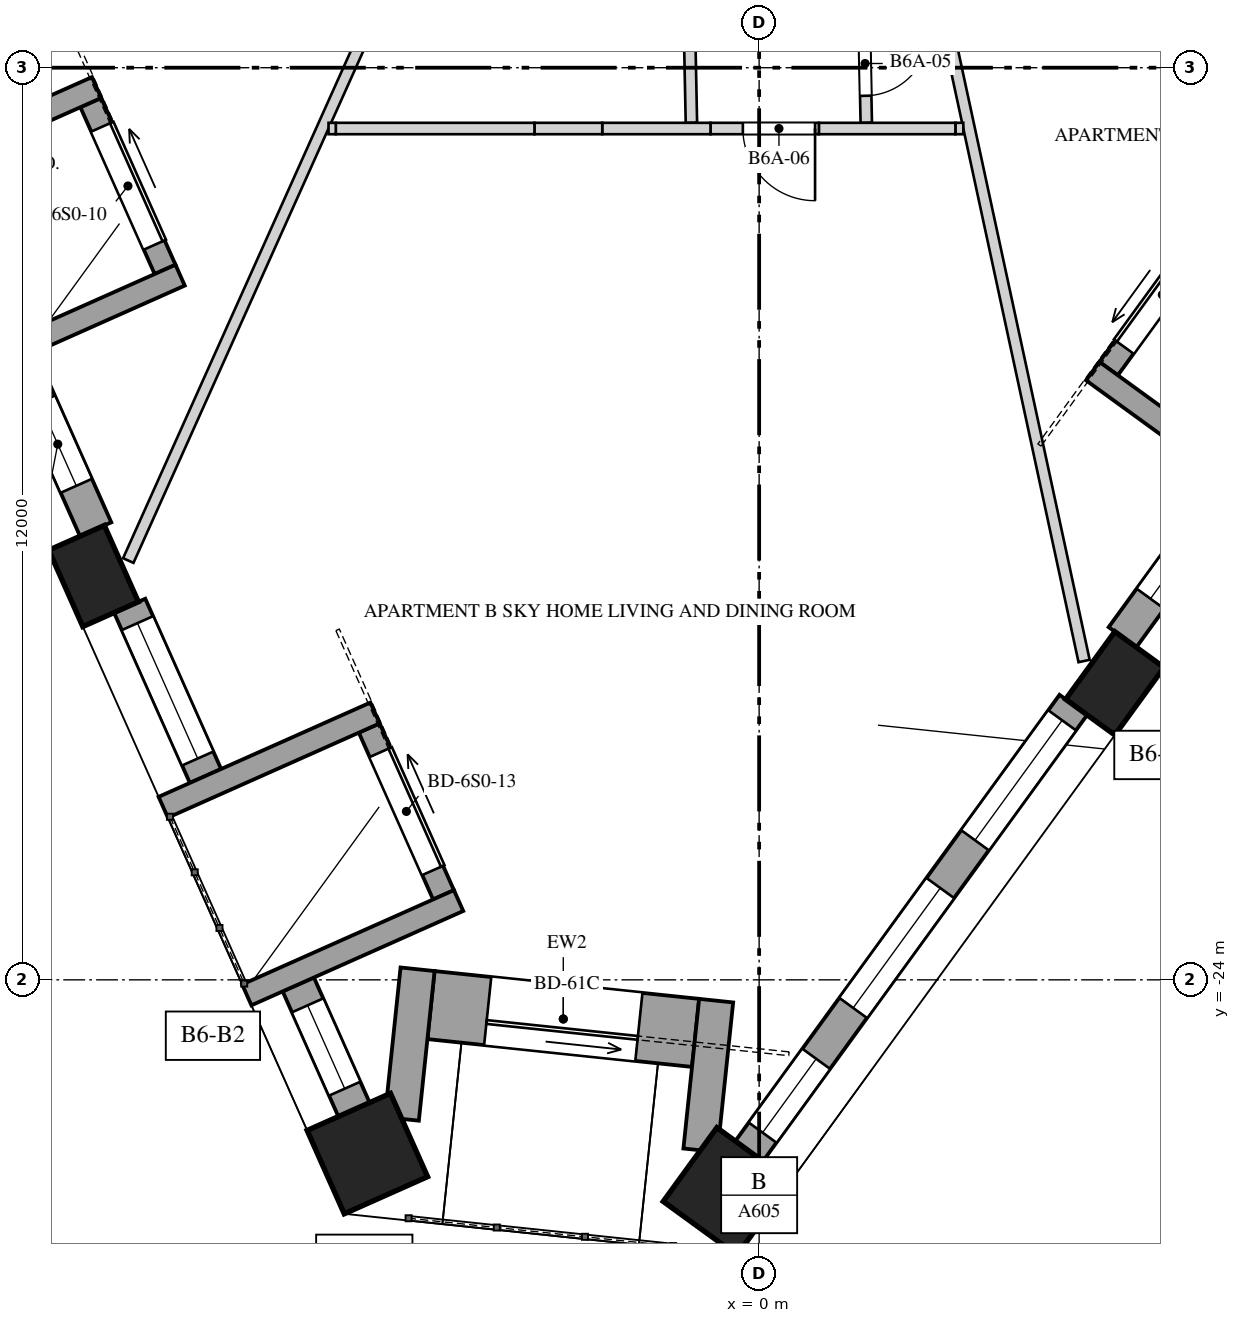
"""IFC4 building model, lengths in metres.
Left out: names, types, materials, properties, quantities, classifications, styles, units other than length and angle.
Written with IfcOpenShell. Run it as: python <this file> out.ifc"""

import sys

from ifc_helpers import new_model, si_unit, direction, frame, frame_2d, origin, origin_2d, place, context, subcontext, project, spatial, polyline, rectangle, outline, extrude, element, fill, save


model = new_model("IFC4")
c1 = context("Model", 3, precision=1e-05, world=origin(), true_north=direction((0.0, 1.0)))
c2 = subcontext(c1, "Body", "Model", "MODEL_VIEW")
j1 = project(units=[si_unit("LENGTHUNIT", "METRE"), si_unit("PLANEANGLEUNIT", "RADIAN")], contexts=[c1])
p1 = place(None, origin())
s1 = spatial("IfcSite", under=j1, at=p1, CompositionType="ELEMENT")
p2 = place(p1, origin())
s2 = spatial("IfcBuilding", under=s1, at=p2, CompositionType="ELEMENT")
p3 = place(p2, frame((0.0, 0.0, 245.2)))
s3 = spatial("IfcBuildingStorey", under=s2, at=p3, CompositionType="ELEMENT", Elevation=245.2)
p4 = place(p3, frame((-8.756, -18.687, 0.0), z_axis=(0.0, 0.0, 1.0), x_axis=(0.406736643076, -0.913545457643, 0.0)))
e1 = element("IfcColumn", 1, at=p4, inside=s3, PredefinedType="COLUMN", context=c2, shape_type="SweptSolid", body=[
    extrude(rectangle(XDim=1.1, YDim=0.8, at=origin_2d()), origin(), (0.0, 0.0, 1.0), 4.0),
])
for number, where, z_axis, x_axis in (
    (2, (-5.154, -26.286, 0.0), (0.0, 0.0, 1.0), (0.407, -0.914, 0.0)),
    (3, (-0.423, -26.783, 0.0), (0.0, 0.0, 1.0), (0.588, 0.809, 0.0)),
):
    element("IfcColumn", number, at=place(p3, frame(where, z_axis=z_axis, x_axis=x_axis)), inside=s3, PredefinedType="COLUMN", context=c2, shape_type="SweptSolid", body=[
        extrude(rectangle(XDim=1.2, YDim=1.2, at=origin_2d()), origin(), (0.0, 0.0, 1.0), 4.0),
    ])
p5 = place(p3, frame((4.68, -20.099, 0.0), z_axis=(0.0, 0.0, 1.0), x_axis=(0.587785252292, 0.809016994375, 0.0)))
e4 = element("IfcColumn", 4, at=p5, inside=s3, PredefinedType="COLUMN", context=c2, shape_type="SweptSolid", body=[
    extrude(rectangle(XDim=1.1, YDim=0.8, at=origin_2d()), origin(), (0.0, 0.0, 1.0), 4.0),
])
p6 = place(p3, frame((-9.726, -15.833, 0.0), z_axis=(0.0, 0.0, 1.0), x_axis=(0.406701876909, -0.913560935745, 0.0)))
e5 = element("IfcWall", 5, at=p6, inside=s3, PredefinedType="SOLIDWALL", context=c2, shape_type="SweptSolid", body=[
    extrude(rectangle(XDim=2.452, YDim=0.45, at=frame_2d((1.226, 0.0))), origin(), (0.0, 0.0, 1.0), 3.3),
])
p7 = place(p6, frame((0.626, 0.0, 0.4)))
e6 = element("IfcOpeningElement", 6, at=p7, cuts=e5, PredefinedType="OPENING", context=c2, shape_type="SweptSolid", body=[
    extrude(rectangle(XDim=1.2, YDim=2.75, at=frame_2d((0.6, 1.375))), frame((0.0, 0.235, 0.0), z_axis=(0.0, -1.0, 0.0), x_axis=(1.0, 0.0, 0.0)), (0.0, 0.0, 1.0), 0.47),
])
p8 = place(p3, frame((-8.281, -19.078, 0.0), z_axis=(0.0, 0.0, 1.0), x_axis=(0.406701876909, -0.913560935745, 0.0)))
e7 = element("IfcWall", 7, at=p8, inside=s3, PredefinedType="SOLIDWALL", context=c2, shape_type="SweptSolid", body=[
    extrude(rectangle(XDim=2.452, YDim=0.45, at=frame_2d((1.226, 0.0))), origin(), (0.0, 0.0, 1.0), 3.3),
])
p9 = place(p8, frame((0.251, 0.0, 0.4)))
e8 = element("IfcOpeningElement", 8, at=p9, cuts=e7, PredefinedType="OPENING", context=c2, shape_type="SweptSolid", body=[
    extrude(rectangle(XDim=1.95, YDim=2.75, at=frame_2d((0.975, 1.375))), frame((0.0, 0.235, 0.0), z_axis=(0.0, -1.0, 0.0), x_axis=(1.0, 0.0, 0.0)), (0.0, 0.0, 1.0), 0.47),
])
p10 = place(p3, frame((-6.063, -24.061, 0.0), z_axis=(0.0, 0.0, 1.0), x_axis=(0.406666293293, -0.913576776138, 0.0)))
e9 = element("IfcWall", 9, at=p10, inside=s3, PredefinedType="SOLIDWALL", context=c2, shape_type="SweptSolid", body=[
    extrude(rectangle(XDim=1.802, YDim=0.45, at=frame_2d((0.901, 0.0))), origin(), (0.0, 0.0, 1.0), 3.3),
])
p11 = place(p10, frame((0.301, 0.0, 0.4)))
e10 = element("IfcOpeningElement", 10, at=p11, cuts=e9, PredefinedType="OPENING", context=c2, shape_type="SweptSolid", body=[
    extrude(rectangle(XDim=1.2, YDim=2.1, at=frame_2d((0.6, 1.05))), frame((0.0, 0.235, 0.0), z_axis=(0.0, -1.0, 0.0), x_axis=(1.0, 0.0, 0.0)), (0.0, 0.0, 1.0), 0.47),
])
p12 = place(p3, frame((-0.131, -26.253, 0.0), z_axis=(0.0, 0.0, 1.0), x_axis=(0.587781549195, 0.80901968482, 0.0)))
e11 = element("IfcWall", 11, at=p12, inside=s3, PredefinedType="SOLIDWALL", context=c2, shape_type="SweptSolid", body=[
    extrude(rectangle(XDim=7.257, YDim=0.45, at=frame_2d((3.628, 0.0))), origin(), (0.0, 0.0, 1.0), 3.3),
])
p13 = place(p12, frame((0.301, 0.0, 0.4)))
e12 = element("IfcOpeningElement", 12, at=p13, cuts=e11, PredefinedType="OPENING", context=c2, shape_type="SweptSolid", body=[
    extrude(rectangle(XDim=1.2, YDim=2.1, at=frame_2d((0.6, 1.05))), frame((0.0, 0.235, 0.0), z_axis=(0.0, -1.0, 0.0), x_axis=(1.0, 0.0, 0.0)), (0.0, 0.0, 1.0), 0.47),
])
p14 = place(p12, frame((2.328, 0.0, 0.4)))
e13 = element("IfcOpeningElement", 13, at=p14, cuts=e11, PredefinedType="OPENING", context=c2, shape_type="SweptSolid", body=[
    extrude(rectangle(XDim=1.95, YDim=2.75, at=frame_2d((0.975, 1.375))), frame((0.0, 0.235, 0.0), z_axis=(0.0, -1.0, 0.0), x_axis=(1.0, 0.0, 0.0)), (0.0, 0.0, 1.0), 0.47),
])
p15 = place(p12, frame((5.056, 0.0, 0.4)))
e14 = element("IfcOpeningElement", 14, at=p15, cuts=e11, PredefinedType="OPENING", context=c2, shape_type="SweptSolid", body=[
    extrude(rectangle(XDim=1.95, YDim=2.75, at=frame_2d((0.975, 1.375))), frame((0.0, 0.235, 0.0), z_axis=(0.0, -1.0, 0.0), x_axis=(1.0, 0.0, 0.0)), (0.0, 0.0, 1.0), 0.47),
])
p16 = place(p3, frame((4.781, -19.493, 0.0), z_axis=(0.0, 0.0, 1.0), x_axis=(0.587792773076, 0.809011530152, 0.0)))
e15 = element("IfcWall", 15, at=p16, inside=s3, PredefinedType="SOLIDWALL", context=c2, shape_type="SweptSolid", body=[
    extrude(rectangle(XDim=2.452, YDim=0.45, at=frame_2d((1.226, 0.0))), origin(), (0.0, 0.0, 1.0), 3.3),
])
p17 = place(p16, frame((0.626, 0.0, 0.4)))
e16 = element("IfcOpeningElement", 16, at=p17, cuts=e15, PredefinedType="OPENING", context=c2, shape_type="SweptSolid", body=[
    extrude(rectangle(XDim=1.2, YDim=2.75, at=frame_2d((0.6, 1.375))), frame((0.0, 0.235, 0.0), z_axis=(0.0, -1.0, 0.0), x_axis=(1.0, 0.0, 0.0)), (0.0, 0.0, 1.0), 0.47),
])
p18 = place(p3, frame((-8.793, -12.459, 0.0), z_axis=(0.0, 0.0, 1.0), x_axis=(0.406723017018, -0.913551524232, 0.0)))
e17 = element("IfcWall", 17, at=p18, inside=s3, PredefinedType="SOLIDWALL", context=c2, shape_type="SweptSolid", body=[
    extrude(rectangle(XDim=2.402, YDim=0.3, at=frame_2d((1.201, 0.0))), origin(), (0.0, 0.0, 1.0), 3.3),
])
p19 = place(p18, frame((0.351, 0.0, 0.0)))
e18 = element("IfcOpeningElement", 18, at=p19, cuts=e17, PredefinedType="OPENING", context=c2, shape_type="SweptSolid", body=[
    extrude(rectangle(XDim=1.7, YDim=2.5, at=frame_2d((0.85, 1.25))), frame((0.0, 0.16, 0.0), z_axis=(0.0, -1.0, 0.0), x_axis=(1.0, 0.0, 0.0)), (0.0, 0.0, 1.0), 0.32),
])
for number, where, z_axis, x_axis in (
    (19, (-11.503, -13.501, 0.0), (0.0, 0.0, 1.0), (0.914, 0.407, 0.0)),
    (20, (-10.404, -15.97, 0.0), (0.0, 0.0, 1.0), (0.914, 0.407, 0.0)),
):
    element("IfcWall", number, at=place(p3, frame(where, z_axis=z_axis, x_axis=x_axis)), inside=s3, PredefinedType="SOLIDWALL", context=c2, shape_type="SweptSolid", body=[
        extrude(rectangle(XDim=3.05, YDim=0.3, at=frame_2d((1.525, 0.0))), origin(), (0.0, 0.0, 1.0), 3.3),
    ])
p20 = place(p3, frame((-5.129, -20.687, 0.0), z_axis=(0.0, 0.0, 1.0), x_axis=(0.406723017018, -0.913551524232, 0.0)))
e21 = element("IfcWall", 21, at=p20, inside=s3, PredefinedType="SOLIDWALL", context=c2, shape_type="SweptSolid", body=[
    extrude(rectangle(XDim=2.402, YDim=0.3, at=frame_2d((1.201, 0.0))), origin(), (0.0, 0.0, 1.0), 3.3),
])
p21 = place(p20, frame((0.351, 0.0, 0.0)))
e22 = element("IfcOpeningElement", 22, at=p21, cuts=e21, PredefinedType="OPENING", context=c2, shape_type="SweptSolid", body=[
    extrude(rectangle(XDim=1.7, YDim=2.5, at=frame_2d((0.85, 1.25))), frame((0.0, 0.16, 0.0), z_axis=(0.0, -1.0, 0.0), x_axis=(1.0, 0.0, 0.0)), (0.0, 0.0, 1.0), 0.32),
])
for number, where, z_axis, x_axis in (
    (23, (-7.84, -21.729, 0.0), (0.0, 0.0, 1.0), (0.914, 0.407, 0.0)),
    (24, (-6.74, -24.198, 0.0), (0.0, 0.0, 1.0), (0.914, 0.407, 0.0)),
):
    element("IfcWall", number, at=place(p3, frame(where, z_axis=z_axis, x_axis=x_axis)), inside=s3, PredefinedType="SOLIDWALL", context=c2, shape_type="SweptSolid", body=[
        extrude(rectangle(XDim=3.05, YDim=0.3, at=frame_2d((1.525, 0.0))), origin(), (0.0, 0.0, 1.0), 3.3),
    ])
p22 = place(p3, frame((4.598, -15.958, 0.0), z_axis=(0.0, 0.0, 1.0), x_axis=(0.587833242688, 0.808982125137, 0.0)))
e25 = element("IfcWall", 25, at=p22, inside=s3, PredefinedType="SOLIDWALL", context=c2, shape_type="SweptSolid", body=[
    extrude(rectangle(XDim=2.402, YDim=0.3, at=frame_2d((1.201, 0.0))), origin(), (0.0, 0.0, 1.0), 3.3),
])
p23 = place(p22, frame((0.351, 0.0, 0.0)))
e26 = element("IfcOpeningElement", 26, at=p23, cuts=e25, PredefinedType="OPENING", context=c2, shape_type="SweptSolid", body=[
    extrude(rectangle(XDim=1.7, YDim=2.5, at=frame_2d((0.85, 1.25))), frame((0.0, 0.16, 0.0), z_axis=(0.0, -1.0, 0.0), x_axis=(1.0, 0.0, 0.0)), (0.0, 0.0, 1.0), 0.32),
])
p24 = place(p3, frame((6.856, -17.784, 0.0), z_axis=(0.0, 0.0, 1.0), x_axis=(-0.80902328748, 0.587776590479, 0.0)))
e27 = element("IfcWall", 27, at=p24, inside=s3, PredefinedType="SOLIDWALL", context=c2, shape_type="SweptSolid", body=[
    extrude(rectangle(XDim=3.05, YDim=0.3, at=frame_2d((1.525, 0.0))), origin(), (0.0, 0.0, 1.0), 3.3),
])
p25 = place(p3, frame((-0.836, -24.698, 0.0), z_axis=(0.0, 0.0, 1.0), x_axis=(-0.994518821828, 0.104557701916, 0.0)))
e28 = element("IfcWall", 28, at=p25, inside=s3, PredefinedType="SOLIDWALL", context=c2, shape_type="SweptSolid", body=[
    extrude(rectangle(XDim=3.5, YDim=0.9, at=frame_2d((1.75, 0.0))), origin(), (0.0, 0.0, 1.0), 3.3),
])
p26 = place(p25, frame((0.75, 0.0, 0.0)))
e29 = element("IfcOpeningElement", 29, at=p26, cuts=e28, PredefinedType="OPENING", context=c2, shape_type="SweptSolid", body=[
    extrude(rectangle(XDim=2.0, YDim=2.4, at=frame_2d((1.0, 1.2))), frame((0.0, 0.46, 0.0), z_axis=(0.0, -1.0, 0.0), x_axis=(1.0, 0.0, 0.0)), (0.0, 0.0, 1.0), 0.92),
])
for number, where, z_axis, x_axis in (
    (30, (-0.772, -26.242, 0.0), (0.0, 0.0, 1.0), (0.104, 0.995, 0.0)),
    (31, (-4.701, -25.829, 0.0), (0.0, 0.0, 1.0), (0.105, 0.995, 0.0)),
):
    element("IfcWall", number, at=place(p3, frame(where, z_axis=z_axis, x_axis=x_axis)), inside=s3, PredefinedType="SOLIDWALL", context=c2, shape_type="SweptSolid", body=[
        extrude(rectangle(XDim=1.979, YDim=0.45, at=frame_2d((0.99, 0.0))), origin(), (0.0, 0.0, 1.0), 2.55),
    ])
p27 = place(p3, frame((-8.3, -18.484, 0.0), z_axis=(0.0, 0.0, 1.0), x_axis=(0.409625524412, 0.9122537639, 0.0)))
e32 = element("IfcWall", 32, at=p27, inside=s3, PredefinedType="PARTITIONING", context=c2, shape_type="SweptSolid", body=[
    extrude(rectangle(XDim=9.327, YDim=0.15, at=frame_2d((4.664, 0.0))), origin(), (0.0, 0.0, 1.0), 2.75),
])
p28 = place(p3, frame((-0.891, -12.725, 0.0), z_axis=(0.0, 0.0, 1.0), x_axis=(-0.020389814815, 0.999792106116, 0.0)))
e33 = element("IfcWall", 33, at=p28, inside=s3, PredefinedType="PARTITIONING", context=c2, shape_type="SweptSolid", body=[
    extrude(rectangle(XDim=2.826, YDim=0.15, at=frame_2d((1.413, 0.0))), origin(), (0.0, 0.0, 1.0), 3.65),
])
p29 = place(p3, frame((1.352, -9.9, 0.0), z_axis=(0.0, 0.0, 1.0), x_axis=(0.020303452986, -0.999793863652, 0.0)))
e34 = element("IfcWall", 34, at=p29, inside=s3, PredefinedType="PARTITIONING", context=c2, shape_type="SweptSolid", body=[
    extrude(rectangle(XDim=2.826, YDim=0.15, at=frame_2d((1.413, 0.0))), origin(), (0.0, 0.0, 1.0), 3.65),
])
p30 = place(p29, frame((1.62, 0.0, 0.0)))
e35 = element("IfcOpeningElement", 35, at=p30, cuts=e34, PredefinedType="OPENING", context=c2, shape_type="SweptSolid", body=[
    extrude(rectangle(XDim=0.85, YDim=2.4, at=frame_2d((0.425, 1.2))), frame((0.0, 0.085, 0.0), z_axis=(0.0, -1.0, 0.0), x_axis=(1.0, 0.0, 0.0)), (0.0, 0.0, 1.0), 0.17),
])
p31 = place(p3, frame((2.153, -9.975, 0.0), z_axis=(0.0, 0.0, 1.0), x_axis=(0.210986150263, -0.977489050781, 0.0)))
e36 = element("IfcWall", 36, at=p31, inside=s3, PredefinedType="PARTITIONING", context=c2, shape_type="SweptSolid", body=[
    extrude(rectangle(XDim=10.057, YDim=0.15, at=frame_2d((5.028, 0.0))), origin(), (0.0, 0.0, 1.0), 2.75),
])
p32 = place(p3, frame((2.686, -12.8, 0.0), z_axis=(0.0, 0.0, 1.0), x_axis=(-1.0, 0.0, 0.0)))
e37 = element("IfcWall", 37, at=p32, inside=s3, PredefinedType="PARTITIONING", context=c2, shape_type="SweptSolid", body=[
    extrude(rectangle(XDim=0.104, YDim=0.15, at=frame_2d((0.052, 0.0))), origin(), (0.0, 0.0, 1.0), 2.75),
])
p33 = place(p3, frame((2.582, -12.8, 0.0), z_axis=(0.0, 0.0, 1.0), x_axis=(-1.0, 0.0, 0.0)))
e38 = element("IfcWall", 38, at=p33, inside=s3, PredefinedType="PARTITIONING", context=c2, shape_type="SweptSolid", body=[
    extrude(rectangle(XDim=1.796, YDim=0.15, at=frame_2d((0.898, 0.0))), origin(), (0.0, 0.0, 1.0), 3.65),
])
p34 = place(p3, frame((0.786, -12.8, 0.0), z_axis=(0.0, 0.0, 1.0), x_axis=(-1.0, 0.0, 0.0)))
e39 = element("IfcWall", 39, at=p34, inside=s3, PredefinedType="PARTITIONING", context=c2, shape_type="SweptSolid", body=[
    extrude(outline(polyline([(0.0, 0.0), (1.426, 0.0), (1.426, 2.55), (0.551, 2.55), (0.551, 3.65), (0.0, 3.65), (0.0, 0.0)])), frame((0.0, 0.075, 0.0), z_axis=(0.0, -1.0, 0.0), x_axis=(1.0, 0.0, 0.0)), (0.0, 0.0, 1.0), 0.15),
])
p35 = place(p34, frame((0.05, 0.0, 0.0)))
e40 = element("IfcOpeningElement", 40, at=p35, cuts=e39, PredefinedType="OPENING", context=c2, shape_type="SweptSolid", body=[
    extrude(rectangle(XDim=0.95, YDim=2.4, at=frame_2d((0.475, 1.2))), frame((0.0, 0.085, 0.0), z_axis=(0.0, -1.0, 0.0), x_axis=(1.0, 0.0, 0.0)), (0.0, 0.0, 1.0), 0.17),
])
p36 = place(p3, frame((-0.64, -12.8, 0.0), z_axis=(0.0, 0.0, 1.0), x_axis=(-1.0, 0.0, 0.0)))
e41 = element("IfcWall", 41, at=p36, inside=s3, PredefinedType="PARTITIONING", context=c2, shape_type="SweptSolid", body=[
    extrude(rectangle(XDim=1.424, YDim=0.15, at=frame_2d((0.712, 0.0))), origin(), (0.0, 0.0, 1.0), 3.65),
])
p37 = place(p3, frame((-2.064, -12.8, 0.0), z_axis=(0.0, 0.0, 1.0), x_axis=(-1.0, 0.0, 0.0)))
e42 = element("IfcWall", 42, at=p37, inside=s3, PredefinedType="PARTITIONING", context=c2, shape_type="SweptSolid", body=[
    extrude(rectangle(XDim=0.892, YDim=0.15, at=frame_2d((0.446, 0.0))), origin(), (0.0, 0.0, 1.0), 2.55),
])
p38 = place(p3, frame((-2.956, -12.8, 0.0), z_axis=(0.0, 0.0, 1.0), x_axis=(-1.0, 0.0, 0.0)))
e43 = element("IfcWall", 43, at=p38, inside=s3, PredefinedType="PARTITIONING", context=c2, shape_type="SweptSolid", body=[
    extrude(rectangle(XDim=2.614, YDim=0.15, at=frame_2d((1.307, 0.0))), origin(), (0.0, 0.0, 1.0), 3.65),
])
p39 = place(p3, frame((-5.57, -12.8, 0.0), z_axis=(0.0, 0.0, 1.0), x_axis=(-1.0, 0.0, 0.0)))
e44 = element("IfcWall", 44, at=p39, inside=s3, PredefinedType="PARTITIONING", context=c2, shape_type="SweptSolid", body=[
    extrude(rectangle(XDim=0.095, YDim=0.15, at=frame_2d((0.048, 0.0))), origin(), (0.0, 0.0, 1.0), 2.75),
])
p40 = place(p7, origin())
e45 = element("IfcWindow", 45, at=p40, inside=s3, PartitioningType="SINGLE_PANEL", PredefinedType="WINDOW", context=c2, shape_type="SweptSolid", body=[
    extrude(rectangle(XDim=1.2, YDim=2.75, at=frame_2d((0.6, 1.375))), frame((0.0, 0.03, 0.0), z_axis=(0.0, -1.0, 0.0), x_axis=(1.0, 0.0, 0.0)), (0.0, 0.0, 1.0), 0.06),
])
fill(e6, e45)
p41 = place(p9, origin())
e46 = element("IfcWindow", 46, at=p41, inside=s3, PartitioningType="SINGLE_PANEL", PredefinedType="WINDOW", context=c2, shape_type="SweptSolid", body=[
    extrude(rectangle(XDim=1.95, YDim=2.75, at=frame_2d((0.975, 1.375))), frame((0.0, 0.03, 0.0), z_axis=(0.0, -1.0, 0.0), x_axis=(1.0, 0.0, 0.0)), (0.0, 0.0, 1.0), 0.06),
])
fill(e8, e46)
p42 = place(p11, origin())
e47 = element("IfcWindow", 47, at=p42, inside=s3, PartitioningType="SINGLE_PANEL", PredefinedType="WINDOW", context=c2, shape_type="SweptSolid", body=[
    extrude(rectangle(XDim=1.2, YDim=2.1, at=frame_2d((0.6, 1.05))), frame((0.0, 0.03, 0.0), z_axis=(0.0, -1.0, 0.0), x_axis=(1.0, 0.0, 0.0)), (0.0, 0.0, 1.0), 0.06),
])
fill(e10, e47)
p43 = place(p13, origin())
e48 = element("IfcWindow", 48, at=p43, inside=s3, PartitioningType="SINGLE_PANEL", PredefinedType="WINDOW", context=c2, shape_type="SweptSolid", body=[
    extrude(rectangle(XDim=1.2, YDim=2.1, at=frame_2d((0.6, 1.05))), frame((0.0, 0.03, 0.0), z_axis=(0.0, -1.0, 0.0), x_axis=(1.0, 0.0, 0.0)), (0.0, 0.0, 1.0), 0.06),
])
fill(e12, e48)
p44 = place(p14, origin())
e49 = element("IfcWindow", 49, at=p44, inside=s3, PartitioningType="SINGLE_PANEL", PredefinedType="WINDOW", context=c2, shape_type="SweptSolid", body=[
    extrude(rectangle(XDim=1.95, YDim=2.75, at=frame_2d((0.975, 1.375))), frame((0.0, 0.03, 0.0), z_axis=(0.0, -1.0, 0.0), x_axis=(1.0, 0.0, 0.0)), (0.0, 0.0, 1.0), 0.06),
])
fill(e13, e49)
p45 = place(p15, origin())
e50 = element("IfcWindow", 50, at=p45, inside=s3, PartitioningType="SINGLE_PANEL", PredefinedType="WINDOW", context=c2, shape_type="SweptSolid", body=[
    extrude(rectangle(XDim=1.95, YDim=2.75, at=frame_2d((0.975, 1.375))), frame((0.0, 0.03, 0.0), z_axis=(0.0, -1.0, 0.0), x_axis=(1.0, 0.0, 0.0)), (0.0, 0.0, 1.0), 0.06),
])
fill(e14, e50)
p46 = place(p17, origin())
e51 = element("IfcWindow", 51, at=p46, inside=s3, PartitioningType="SINGLE_PANEL", PredefinedType="WINDOW", context=c2, shape_type="SweptSolid", body=[
    extrude(rectangle(XDim=1.2, YDim=2.75, at=frame_2d((0.6, 1.375))), frame((0.0, 0.03, 0.0), z_axis=(0.0, -1.0, 0.0), x_axis=(1.0, 0.0, 0.0)), (0.0, 0.0, 1.0), 0.06),
])
fill(e16, e51)
p47 = place(p19, origin())
e52 = element("IfcDoor", 52, at=p47, inside=s3, OperationType="SLIDING_TO_LEFT", PredefinedType="DOOR", context=c2, shape_type="SweptSolid", body=[
    extrude(rectangle(XDim=1.7, YDim=2.5, at=frame_2d((0.85, 1.25))), frame((0.0, 0.025, 0.0), z_axis=(0.0, -1.0, 0.0), x_axis=(1.0, 0.0, 0.0)), (0.0, 0.0, 1.0), 0.05),
])
fill(e18, e52)
p48 = place(p21, origin())
e53 = element("IfcDoor", 53, at=p48, inside=s3, OperationType="SLIDING_TO_LEFT", PredefinedType="DOOR", context=c2, shape_type="SweptSolid", body=[
    extrude(rectangle(XDim=1.7, YDim=2.5, at=frame_2d((0.85, 1.25))), frame((0.0, 0.025, 0.0), z_axis=(0.0, -1.0, 0.0), x_axis=(1.0, 0.0, 0.0)), (0.0, 0.0, 1.0), 0.05),
])
fill(e22, e53)
p49 = place(p23, origin())
e54 = element("IfcDoor", 54, at=p49, inside=s3, OperationType="SLIDING_TO_LEFT", PredefinedType="DOOR", context=c2, shape_type="SweptSolid", body=[
    extrude(rectangle(XDim=1.7, YDim=2.5, at=frame_2d((0.85, 1.25))), frame((0.0, 0.025, 0.0), z_axis=(0.0, -1.0, 0.0), x_axis=(1.0, 0.0, 0.0)), (0.0, 0.0, 1.0), 0.05),
])
fill(e26, e54)
p50 = place(p26, origin())
e55 = element("IfcDoor", 55, at=p50, inside=s3, OperationType="SLIDING_TO_LEFT", PredefinedType="DOOR", context=c2, shape_type="SweptSolid", body=[
    extrude(rectangle(XDim=2.0, YDim=2.4, at=frame_2d((1.0, 1.2))), frame((0.0, 0.025, 0.0), z_axis=(0.0, -1.0, 0.0), x_axis=(1.0, 0.0, 0.0)), (0.0, 0.0, 1.0), 0.05),
])
fill(e29, e55)
p51 = place(p30, origin())
e56 = element("IfcDoor", 56, at=p51, inside=s3, OperationType="SINGLE_SWING_LEFT", PredefinedType="DOOR", context=c2, shape_type="SweptSolid", body=[
    extrude(rectangle(XDim=0.85, YDim=2.4, at=frame_2d((0.425, 1.2))), frame((0.0, 0.025, 0.0), z_axis=(0.0, -1.0, 0.0), x_axis=(1.0, 0.0, 0.0)), (0.0, 0.0, 1.0), 0.05),
])
fill(e35, e56)
p52 = place(p35, origin())
e57 = element("IfcDoor", 57, at=p52, inside=s3, OperationType="SINGLE_SWING_RIGHT", PredefinedType="DOOR", context=c2, shape_type="SweptSolid", body=[
    extrude(rectangle(XDim=0.95, YDim=2.4, at=frame_2d((0.475, 1.2))), frame((0.0, 0.025, 0.0), z_axis=(0.0, -1.0, 0.0), x_axis=(1.0, 0.0, 0.0)), (0.0, 0.0, 1.0), 0.05),
])
fill(e40, e57)
save(model, sys.argv[1])
